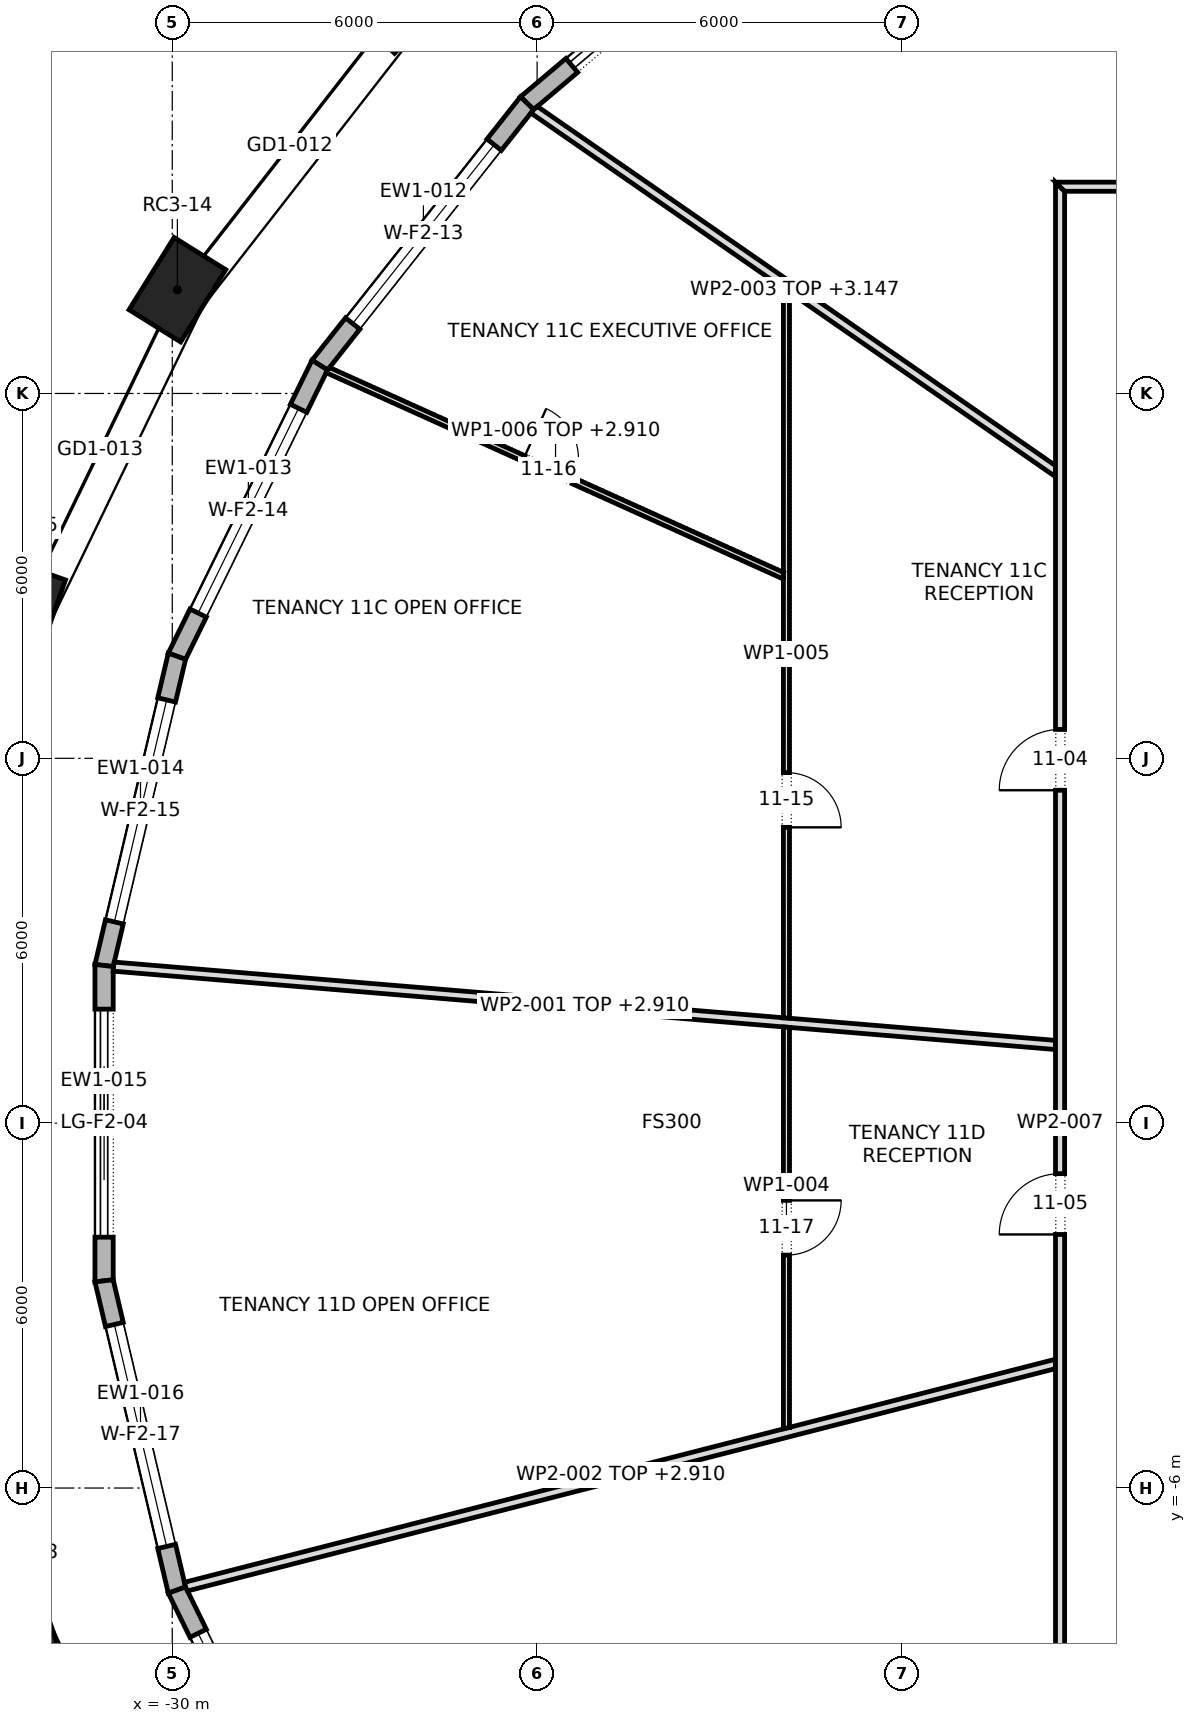
"""IFC4 building model, lengths in metres.
Left out: names, types, materials, properties, quantities, classifications, styles, units other than length and angle.
Written with IfcOpenShell. Run it as: python <this file> out.ifc"""

import sys

from ifc_helpers import new_model, si_unit, direction, frame, frame_2d, origin, origin_2d, place, context, subcontext, project, spatial, polyline, rectangle, outline, extrude, element, fill, save


model = new_model("IFC4")
c1 = context("Model", 3, precision=1e-05, world=origin(), true_north=direction((0.0, 1.0)))
c2 = subcontext(c1, "Body", "Model", "MODEL_VIEW")
j1 = project(units=[si_unit("LENGTHUNIT", "METRE"), si_unit("PLANEANGLEUNIT", "RADIAN")], contexts=[c1])
p1 = place(None, origin())
s1 = spatial("IfcSite", under=j1, at=p1, CompositionType="ELEMENT")
p2 = place(p1, origin())
s2 = spatial("IfcBuilding", under=s1, at=p2, CompositionType="ELEMENT")
p3 = place(p2, frame((0.0, 0.0, 154.9)))
s3 = spatial("IfcBuildingStorey", under=s2, at=p3, CompositionType="ELEMENT", Elevation=154.9)
for number, where, z_axis, x_axis in (
    (1, (-26.221, 18.445, 0.0), (0.0, 0.0, 1.0), (-0.692, -0.722, 0.0)),
    (2, (-29.916, 13.706, 0.0), (0.0, 0.0, 1.0), (-0.529, -0.849, 0.0)),
    (3, (-32.46, 8.44, 0.0), (0.0, 0.0, 1.0), (-0.334, -0.943, 0.0)),
    (4, (-32.46, -8.44, 0.0), (0.0, 0.0, 1.0), (0.334, -0.943, 0.0)),
):
    element("IfcColumn", number, at=place(p3, frame(where, z_axis=z_axis, x_axis=x_axis)), inside=s3, PredefinedType="COLUMN", context=c2, shape_type="SweptSolid", body=[
        extrude(rectangle(XDim=1.4, YDim=1.0, at=origin_2d()), origin(), (0.0, 0.0, 1.0), 4.2),
    ])
p4 = place(p3, frame((-19.829, 20.435, 0.0), z_axis=(0.0, 0.0, 1.0), x_axis=(-0.764076096085, -0.645126126732, 0.0)))
e5 = element("IfcWall", 5, at=p4, inside=s3, PredefinedType="STANDARD", context=c2, shape_type="SweptSolid", body=[
    extrude(outline(polyline([(-0.014, -0.15), (5.69, -0.15), (5.66, 0.15), (0.014, 0.15), (-0.014, -0.15)])), origin(), (0.0, 0.0, 1.0), 3.9),
])
p5 = place(p4, frame((0.962, 0.0, 0.0)))
e6 = element("IfcOpeningElement", 6, at=p5, cuts=e5, PredefinedType="OPENING", context=c2, shape_type="SweptSolid", body=[
    extrude(rectangle(XDim=3.75, YDim=3.45, at=frame_2d((1.875, 1.725))), frame((0.0, 0.162, 0.0), z_axis=(0.0, -1.0, 0.0), x_axis=(1.0, 0.0, 0.0)), (0.0, 0.0, 1.0), 0.324),
])
p6 = place(p3, frame((-24.165, 16.774, 0.0), z_axis=(0.0, 0.0, 1.0), x_axis=(-0.620577705153, -0.784144955902, 0.0)))
e7 = element("IfcWall", 7, at=p6, inside=s3, PredefinedType="STANDARD", context=c2, shape_type="SweptSolid", body=[
    extrude(outline(polyline([(-0.015, -0.15), (5.509, -0.15), (5.477, 0.15), (0.015, 0.15), (-0.015, -0.15)])), origin(), (0.0, 0.0, 1.0), 3.9),
])
p7 = place(p6, frame((0.871, 0.0, 0.6)))
e8 = element("IfcOpeningElement", 8, at=p7, cuts=e7, PredefinedType="OPENING", context=c2, shape_type="SweptSolid", body=[
    extrude(rectangle(XDim=3.75, YDim=2.85, at=frame_2d((1.875, 1.425))), frame((0.0, 0.162, 0.0), z_axis=(0.0, -1.0, 0.0), x_axis=(1.0, 0.0, 0.0)), (0.0, 0.0, 1.0), 0.324),
])
p8 = place(p3, frame((-27.574, 12.467, 0.0), z_axis=(0.0, 0.0, 1.0), x_axis=(-0.440444485575, -0.897779847806, 0.0)))
e9 = element("IfcWall", 9, at=p8, inside=s3, PredefinedType="STANDARD", context=c2, shape_type="SweptSolid", body=[
    extrude(outline(polyline([(-0.016, -0.15), (5.35, -0.15), (5.317, 0.15), (0.016, 0.15), (-0.016, -0.15)])), origin(), (0.0, 0.0, 1.0), 3.9),
])
p9 = place(p8, frame((0.792, 0.0, 0.6)))
e10 = element("IfcOpeningElement", 10, at=p9, cuts=e9, PredefinedType="OPENING", context=c2, shape_type="SweptSolid", body=[
    extrude(rectangle(XDim=3.75, YDim=2.85, at=frame_2d((1.875, 1.425))), frame((0.0, 0.162, 0.0), z_axis=(0.0, -1.0, 0.0), x_axis=(1.0, 0.0, 0.0)), (0.0, 0.0, 1.0), 0.324),
])
p10 = place(p3, frame((-29.923, 7.678, 0.0), z_axis=(0.0, 0.0, 1.0), x_axis=(-0.229297175564, -0.973356463624, 0.0)))
e11 = element("IfcWall", 11, at=p10, inside=s3, PredefinedType="STANDARD", context=c2, shape_type="SweptSolid", body=[
    extrude(outline(polyline([(-0.017, -0.15), (5.242, -0.15), (5.207, 0.15), (0.017, 0.15), (-0.017, -0.15)])), origin(), (0.0, 0.0, 1.0), 3.9),
])
p11 = place(p10, frame((0.737, 0.0, 0.6)))
e12 = element("IfcOpeningElement", 12, at=p11, cuts=e11, PredefinedType="OPENING", context=c2, shape_type="SweptSolid", body=[
    extrude(rectangle(XDim=3.75, YDim=2.85, at=frame_2d((1.875, 1.425))), frame((0.0, 0.162, 0.0), z_axis=(0.0, -1.0, 0.0), x_axis=(1.0, 0.0, 0.0)), (0.0, 0.0, 1.0), 0.324),
])
p12 = place(p3, frame((-31.121, 2.593, 0.0), z_axis=(0.0, 0.0, 1.0), x_axis=(0.0, -1.0, 0.0)))
e13 = element("IfcWall", 13, at=p12, inside=s3, PredefinedType="STANDARD", context=c2, shape_type="SweptSolid", body=[
    extrude(outline(polyline([(-0.017, -0.15), (5.203, -0.15), (5.168, 0.15), (0.017, 0.15), (-0.017, -0.15)])), origin(), (0.0, 0.0, 1.0), 3.9),
])
p13 = place(p12, frame((0.718, 0.0, 0.0)))
e14 = element("IfcOpeningElement", 14, at=p13, cuts=e13, PredefinedType="OPENING", context=c2, shape_type="SweptSolid", body=[
    extrude(rectangle(XDim=3.75, YDim=3.45, at=frame_2d((1.875, 1.725))), frame((0.0, 0.162, 0.0), z_axis=(0.0, -1.0, 0.0), x_axis=(1.0, 0.0, 0.0)), (0.0, 0.0, 1.0), 0.324),
])
p14 = place(p3, frame((-31.121, -2.593, 0.0), z_axis=(0.0, 0.0, 1.0), x_axis=(0.229297175564, -0.973356463624, 0.0)))
e15 = element("IfcWall", 15, at=p14, inside=s3, PredefinedType="STANDARD", context=c2, shape_type="SweptSolid", body=[
    extrude(outline(polyline([(-0.017, -0.15), (5.241, -0.15), (5.208, 0.15), (0.017, 0.15), (-0.017, -0.15)])), origin(), (0.0, 0.0, 1.0), 3.9),
])
p15 = place(p14, frame((0.737, 0.0, 0.6)))
e16 = element("IfcOpeningElement", 16, at=p15, cuts=e15, PredefinedType="OPENING", context=c2, shape_type="SweptSolid", body=[
    extrude(rectangle(XDim=3.75, YDim=2.85, at=frame_2d((1.875, 1.425))), frame((0.0, 0.162, 0.0), z_axis=(0.0, -1.0, 0.0), x_axis=(1.0, 0.0, 0.0)), (0.0, 0.0, 1.0), 0.324),
])
p16 = place(p3, frame((-29.923, -7.678, 0.0), z_axis=(0.0, 0.0, 1.0), x_axis=(0.440444485575, -0.897779847806, 0.0)))
e17 = element("IfcWall", 17, at=p16, inside=s3, PredefinedType="STANDARD", context=c2, shape_type="SweptSolid", body=[
    extrude(outline(polyline([(-0.017, -0.15), (5.35, -0.15), (5.317, 0.15), (0.017, 0.15), (-0.017, -0.15)])), origin(), (0.0, 0.0, 1.0), 3.9),
])
p17 = place(p16, frame((0.792, 0.0, 0.6)))
e18 = element("IfcOpeningElement", 18, at=p17, cuts=e17, PredefinedType="OPENING", context=c2, shape_type="SweptSolid", body=[
    extrude(rectangle(XDim=3.75, YDim=2.85, at=frame_2d((1.875, 1.425))), frame((0.0, 0.162, 0.0), z_axis=(0.0, -1.0, 0.0), x_axis=(1.0, 0.0, 0.0)), (0.0, 0.0, 1.0), 0.324),
])
p18 = place(p3, frame((-30.965, 2.574, 0.0), z_axis=(0.0, 0.0, 1.0), x_axis=(0.996560145348, -0.082872653534, 0.0)))
e19 = element("IfcWall", 19, at=p18, inside=s3, PredefinedType="PARTITIONING", context=c2, shape_type="SweptSolid", body=[
    extrude(outline(polyline([(0.0, -0.075), (1.86, -0.075), (3.72, -0.075), (5.579, -0.075), (7.439, -0.075), (9.299, -0.075), (11.159, -0.075), (11.159, -0.075), (11.159, -0.075), (12.622, -0.075), (14.086, -0.075), (15.549, -0.075), (15.549, -0.069), (15.537, 0.075), (14.045, 0.075), (12.553, 0.075), (11.061, 0.075), (11.046, 0.074), (11.046, 0.075), (9.206, 0.075), (7.366, 0.075), (5.525, 0.075), (3.685, 0.075), (1.845, 0.075), (0.004, 0.075), (0.0, 0.045), (0.0, -0.075)])), origin(), (0.0, 0.0, 1.0), 2.91),
])
p19 = place(p3, frame((-29.781, -7.623, 0.0), z_axis=(0.0, 0.0, 1.0), x_axis=(0.968729735343, 0.248118318272, 0.0)))
e20 = element("IfcWall", 20, at=p19, inside=s3, PredefinedType="PARTITIONING", context=c2, shape_type="SweptSolid", body=[
    extrude(outline(polyline([(0.013, -0.075), (1.855, -0.075), (3.697, -0.075), (5.539, -0.075), (7.381, -0.075), (9.223, -0.075), (11.064, -0.075), (12.906, -0.075), (14.748, -0.075), (14.786, 0.073), (14.786, 0.075), (13.281, 0.075), (11.776, 0.075), (10.27, 0.075), (10.27, 0.075), (10.27, 0.075), (8.558, 0.075), (6.847, 0.075), (5.135, 0.075), (3.423, 0.075), (1.712, 0.075), (0.0, 0.075), (0.0, 0.071), (0.0, -0.011), (0.013, -0.075)])), origin(), (0.0, 0.0, 1.0), 2.91),
])
p20 = place(p3, frame((-24.059, 16.673, 0.0), z_axis=(0.0, 0.0, 1.0), x_axis=(0.821818585553, -0.569749254006, 0.0)))
e21 = element("IfcWall", 21, at=p20, inside=s3, PredefinedType="PARTITIONING", context=c2, shape_type="SweptSolid", body=[
    extrude(outline(polyline([(0.0, -0.075), (1.724, -0.075), (3.448, -0.075), (5.172, -0.075), (5.173, -0.074), (5.174, -0.075), (6.948, -0.075), (8.723, -0.075), (10.497, -0.075), (10.497, -0.074), (10.394, 0.075), (8.666, 0.075), (6.938, 0.075), (5.209, 0.075), (3.481, 0.075), (1.753, 0.075), (0.025, 0.075), (0.004, -0.002), (0.0, -0.072), (0.0, -0.075)])), origin(), (0.0, 0.0, 1.0), 3.147),
])
p21 = place(p3, frame((-19.9, -5.028, 0.0), z_axis=(0.0, 0.0, 1.0), x_axis=(0.0, 1.0, 0.0)))
e22 = element("IfcWall", 22, at=p21, inside=s3, PredefinedType="PARTITIONING", context=c2, shape_type="SweptSolid", body=[
    extrude(outline(polyline([(0.025, -0.05), (1.67, -0.05), (3.314, -0.05), (4.958, -0.05), (6.603, -0.05), (6.611, 0.048), (6.611, 0.05), (4.958, 0.05), (3.305, 0.05), (1.653, 0.05), (0.0, 0.05), (0.0, 0.049), (0.025, -0.05)])), origin(), (0.0, 0.0, 1.0), 3.9),
])
p22 = place(p21, frame((2.857, 0.0, 0.0)))
e23 = element("IfcOpeningElement", 23, at=p22, cuts=e22, PredefinedType="OPENING", context=c2, shape_type="SweptSolid", body=[
    extrude(rectangle(XDim=0.9, YDim=2.1, at=frame_2d((0.45, 1.05))), frame((0.0, 0.062, 0.0), z_axis=(0.0, -1.0, 0.0), x_axis=(1.0, 0.0, 0.0)), (0.0, 0.0, 1.0), 0.124),
])
p23 = place(p3, frame((-19.9, 1.726, 0.0), z_axis=(0.0, 0.0, 1.0), x_axis=(0.0, 1.0, 0.0)))
e24 = element("IfcWall", 24, at=p23, inside=s3, PredefinedType="PARTITIONING", context=c2, shape_type="SweptSolid", body=[
    extrude(outline(polyline([(0.0, -0.05), (1.99, -0.05), (3.979, -0.05), (5.969, -0.05), (7.959, -0.05), (9.948, -0.05), (11.938, -0.05), (12.007, 0.049), (12.007, 0.05), (10.448, 0.05), (8.89, 0.05), (7.332, 0.05), (7.331, 0.048), (7.326, 0.05), (5.497, 0.05), (3.667, 0.05), (1.838, 0.05), (0.008, 0.05), (0.0, -0.047), (0.0, -0.05)])), origin(), (0.0, 0.0, 1.0), 3.9),
])
p24 = place(p23, frame((3.139, 0.0, 0.0)))
e25 = element("IfcOpeningElement", 25, at=p24, cuts=e24, PredefinedType="OPENING", context=c2, shape_type="SweptSolid", body=[
    extrude(rectangle(XDim=0.9, YDim=2.1, at=frame_2d((0.45, 1.05))), frame((0.0, 0.062, 0.0), z_axis=(0.0, -1.0, 0.0), x_axis=(1.0, 0.0, 0.0)), (0.0, 0.0, 1.0), 0.124),
])
p25 = place(p3, frame((-19.93, 8.993, 0.0), z_axis=(0.0, 0.0, 1.0), x_axis=(-0.911442933079, 0.411426518033, 0.0)))
e26 = element("IfcWall", 26, at=p25, inside=s3, PredefinedType="PARTITIONING", context=c2, shape_type="SweptSolid", body=[
    extrude(outline(polyline([(0.045, -0.05), (1.683, -0.05), (3.321, -0.05), (4.958, -0.05), (6.596, -0.05), (8.234, -0.05), (8.247, 0.0), (8.248, 0.046), (8.248, 0.05), (6.599, 0.05), (4.949, 0.05), (3.299, 0.05), (1.65, 0.05), (0.0, 0.05), (0.0, 0.049), (0.045, -0.05)])), origin(), (0.0, 0.0, 1.0), 2.91),
])
p26 = place(p25, frame((3.807, 0.0, 0.0)))
e27 = element("IfcOpeningElement", 27, at=p26, cuts=e26, PredefinedType="OPENING", context=c2, shape_type="SweptSolid", body=[
    extrude(rectangle(XDim=0.9, YDim=2.1, at=frame_2d((0.45, 1.05))), frame((0.0, 0.062, 0.0), z_axis=(0.0, -1.0, 0.0), x_axis=(1.0, 0.0, 0.0)), (0.0, 0.0, 1.0), 0.124),
])
p27 = place(p3, frame((-15.4, -15.475, 0.0), z_axis=(0.0, 0.0, 1.0), x_axis=(0.0, 1.0, 0.0)))
e28 = element("IfcWall", 28, at=p27, inside=s3, PredefinedType="PARTITIONING", context=c2, shape_type="SweptSolid", body=[
    extrude(outline(polyline([(0.15, -0.075), (2.066, -0.075), (3.981, -0.075), (5.897, -0.075), (7.812, -0.075), (9.728, -0.075), (11.644, -0.075), (13.56, -0.075), (15.475, -0.075), (17.391, -0.075), (19.306, -0.075), (21.222, -0.075), (23.138, -0.075), (25.053, -0.075), (26.969, -0.075), (28.885, -0.075), (30.8, -0.075), (30.95, 0.075), (29.016, 0.075), (27.081, 0.075), (25.147, 0.075), (23.212, 0.075), (21.278, 0.075), (19.344, 0.075), (17.409, 0.075), (15.475, 0.075), (13.541, 0.075), (11.606, 0.075), (9.672, 0.075), (7.738, 0.075), (5.803, 0.075), (3.869, 0.075), (1.935, 0.075), (0.0, 0.075), (0.15, -0.075)])), origin(), (0.0, 0.0, 1.0), 3.9),
])
p28 = place(p27, frame((20.95, 0.0, 0.0)))
e29 = element("IfcOpeningElement", 29, at=p28, cuts=e28, PredefinedType="OPENING", context=c2, shape_type="SweptSolid", body=[
    extrude(rectangle(XDim=1.0, YDim=2.1, at=frame_2d((0.5, 1.05))), frame((0.0, 0.087, 0.0), z_axis=(0.0, -1.0, 0.0), x_axis=(1.0, 0.0, 0.0)), (0.0, 0.0, 1.0), 0.174),
])
p29 = place(p27, frame((13.645, 0.0, 0.0)))
e30 = element("IfcOpeningElement", 30, at=p29, cuts=e28, PredefinedType="OPENING", context=c2, shape_type="SweptSolid", body=[
    extrude(rectangle(XDim=1.0, YDim=2.1, at=frame_2d((0.5, 1.05))), frame((0.0, 0.087, 0.0), z_axis=(0.0, -1.0, 0.0), x_axis=(1.0, 0.0, 0.0)), (0.0, 0.0, 1.0), 0.174),
])
p30 = place(p27, frame((4.905, 0.0, 0.0)))
e31 = element("IfcOpeningElement", 31, at=p30, cuts=e28, PredefinedType="OPENING", context=c2, shape_type="SweptSolid", body=[
    extrude(rectangle(XDim=1.8, YDim=2.1, at=frame_2d((0.9, 1.05))), frame((0.0, 0.087, 0.0), z_axis=(0.0, -1.0, 0.0), x_axis=(1.0, 0.0, 0.0)), (0.0, 0.0, 1.0), 0.174),
])
p31 = place(p3, frame((-15.475, 15.4, 0.0), z_axis=(0.0, 0.0, 1.0), x_axis=(1.0, 0.0, 0.0)))
e32 = element("IfcWall", 32, at=p31, inside=s3, PredefinedType="PARTITIONING", context=c2, shape_type="SweptSolid", body=[
    extrude(outline(polyline([(17.155, 0.075), (15.249, 0.075), (13.343, 0.075), (11.437, 0.075), (9.531, 0.075), (7.625, 0.075), (5.719, 0.075), (3.812, 0.075), (1.906, 0.075), (0.0, 0.075), (0.15, -0.075), (2.04, -0.075), (3.929, -0.075), (5.818, -0.075), (7.708, -0.075), (9.597, -0.075), (11.487, -0.075), (13.376, -0.075), (15.266, -0.075), (17.155, -0.075), (17.155, 0.075)])), origin(), (0.0, 0.0, 1.0), 3.9),
])
p32 = place(p31, frame((13.05, 0.0, 0.0)))
e33 = element("IfcOpeningElement", 33, at=p32, cuts=e32, PredefinedType="OPENING", context=c2, shape_type="SweptSolid", body=[
    extrude(rectangle(XDim=1.0, YDim=2.1, at=frame_2d((0.5, 1.05))), frame((0.0, 0.087, 0.0), z_axis=(0.0, -1.0, 0.0), x_axis=(1.0, 0.0, 0.0)), (0.0, 0.0, 1.0), 0.174),
])
p33 = place(p31, frame((4.51, 0.0, 0.0)))
e34 = element("IfcOpeningElement", 34, at=p33, cuts=e32, PredefinedType="OPENING", context=c2, shape_type="SweptSolid", body=[
    extrude(rectangle(XDim=1.0, YDim=2.1, at=frame_2d((0.5, 1.05))), frame((0.0, 0.087, 0.0), z_axis=(0.0, -1.0, 0.0), x_axis=(1.0, 0.0, 0.0)), (0.0, 0.0, 1.0), 0.174),
])
p34 = place(p5, origin())
e35 = element("IfcDoor", 35, at=p34, inside=s3, OperationType="DOUBLE_DOOR_SLIDING", PredefinedType="DOOR", context=c2, shape_type="SweptSolid", body=[
    extrude(rectangle(XDim=3.75, YDim=3.45, at=frame_2d((1.875, 1.725))), frame((0.0, 0.025, 0.0), z_axis=(0.0, -1.0, 0.0), x_axis=(1.0, 0.0, 0.0)), (0.0, 0.0, 1.0), 0.05),
])
fill(e6, e35)
p35 = place(p7, origin())
e36 = element("IfcWindow", 36, at=p35, inside=s3, PartitioningType="TRIPLE_PANEL_VERTICAL", PredefinedType="WINDOW", context=c2, shape_type="SweptSolid", body=[
    extrude(rectangle(XDim=3.75, YDim=2.85, at=frame_2d((1.875, 1.425))), frame((0.0, 0.03, 0.0), z_axis=(0.0, -1.0, 0.0), x_axis=(1.0, 0.0, 0.0)), (0.0, 0.0, 1.0), 0.06),
])
fill(e8, e36)
p36 = place(p9, origin())
e37 = element("IfcWindow", 37, at=p36, inside=s3, PartitioningType="TRIPLE_PANEL_VERTICAL", PredefinedType="WINDOW", context=c2, shape_type="SweptSolid", body=[
    extrude(rectangle(XDim=3.75, YDim=2.85, at=frame_2d((1.875, 1.425))), frame((0.0, 0.03, 0.0), z_axis=(0.0, -1.0, 0.0), x_axis=(1.0, 0.0, 0.0)), (0.0, 0.0, 1.0), 0.06),
])
fill(e10, e37)
p37 = place(p11, origin())
e38 = element("IfcWindow", 38, at=p37, inside=s3, PartitioningType="TRIPLE_PANEL_VERTICAL", PredefinedType="WINDOW", context=c2, shape_type="SweptSolid", body=[
    extrude(rectangle(XDim=3.75, YDim=2.85, at=frame_2d((1.875, 1.425))), frame((0.0, 0.03, 0.0), z_axis=(0.0, -1.0, 0.0), x_axis=(1.0, 0.0, 0.0)), (0.0, 0.0, 1.0), 0.06),
])
fill(e12, e38)
p38 = place(p13, origin())
e39 = element("IfcDoor", 39, at=p38, inside=s3, OperationType="DOUBLE_DOOR_SLIDING", PredefinedType="DOOR", context=c2, shape_type="SweptSolid", body=[
    extrude(rectangle(XDim=3.75, YDim=3.45, at=frame_2d((1.875, 1.725))), frame((0.0, 0.025, 0.0), z_axis=(0.0, -1.0, 0.0), x_axis=(1.0, 0.0, 0.0)), (0.0, 0.0, 1.0), 0.05),
])
fill(e14, e39)
p39 = place(p15, origin())
e40 = element("IfcWindow", 40, at=p39, inside=s3, PartitioningType="TRIPLE_PANEL_VERTICAL", PredefinedType="WINDOW", context=c2, shape_type="SweptSolid", body=[
    extrude(rectangle(XDim=3.75, YDim=2.85, at=frame_2d((1.875, 1.425))), frame((0.0, 0.03, 0.0), z_axis=(0.0, -1.0, 0.0), x_axis=(1.0, 0.0, 0.0)), (0.0, 0.0, 1.0), 0.06),
])
fill(e16, e40)
p40 = place(p17, origin())
e41 = element("IfcWindow", 41, at=p40, inside=s3, PartitioningType="TRIPLE_PANEL_VERTICAL", PredefinedType="WINDOW", context=c2, shape_type="SweptSolid", body=[
    extrude(rectangle(XDim=3.75, YDim=2.85, at=frame_2d((1.875, 1.425))), frame((0.0, 0.03, 0.0), z_axis=(0.0, -1.0, 0.0), x_axis=(1.0, 0.0, 0.0)), (0.0, 0.0, 1.0), 0.06),
])
fill(e18, e41)
p41 = place(p28, origin())
e42 = element("IfcDoor", 42, at=p41, inside=s3, OperationType="SINGLE_SWING_RIGHT", PredefinedType="DOOR", context=c2, shape_type="SweptSolid", body=[
    extrude(rectangle(XDim=1.0, YDim=2.1, at=frame_2d((0.5, 1.05))), frame((0.0, 0.025, 0.0), z_axis=(0.0, -1.0, 0.0), x_axis=(1.0, 0.0, 0.0)), (0.0, 0.0, 1.0), 0.05),
])
fill(e29, e42)
p42 = place(p29, origin())
e43 = element("IfcDoor", 43, at=p42, inside=s3, OperationType="SINGLE_SWING_RIGHT", PredefinedType="DOOR", context=c2, shape_type="SweptSolid", body=[
    extrude(rectangle(XDim=1.0, YDim=2.1, at=frame_2d((0.5, 1.05))), frame((0.0, 0.025, 0.0), z_axis=(0.0, -1.0, 0.0), x_axis=(1.0, 0.0, 0.0)), (0.0, 0.0, 1.0), 0.05),
])
fill(e30, e43)
p43 = place(p24, frame((0.9, 0.0, 0.0), z_axis=(0.0, 0.0, 1.0), x_axis=(-1.0, 0.0, 0.0)))
e44 = element("IfcDoor", 44, at=p43, inside=s3, OperationType="SINGLE_SWING_LEFT", PredefinedType="DOOR", context=c2, shape_type="SweptSolid", body=[
    extrude(rectangle(XDim=0.9, YDim=2.1, at=frame_2d((0.45, 1.05))), frame((0.0, 0.025, 0.0), z_axis=(0.0, -1.0, 0.0), x_axis=(1.0, 0.0, 0.0)), (0.0, 0.0, 1.0), 0.05),
])
fill(e25, e44)
p44 = place(p26, frame((0.9, 0.0, 0.0), z_axis=(0.0, 0.0, 1.0), x_axis=(-1.0, 0.0, 0.0)))
e45 = element("IfcDoor", 45, at=p44, inside=s3, OperationType="SINGLE_SWING_RIGHT", PredefinedType="DOOR", context=c2, shape_type="SweptSolid", body=[
    extrude(rectangle(XDim=0.9, YDim=2.1, at=frame_2d((0.45, 1.05))), frame((0.0, 0.025, 0.0), z_axis=(0.0, -1.0, 0.0), x_axis=(1.0, 0.0, 0.0)), (0.0, 0.0, 1.0), 0.05),
])
fill(e27, e45)
p45 = place(p22, frame((0.9, 0.0, 0.0), z_axis=(0.0, 0.0, 1.0), x_axis=(-1.0, 0.0, 0.0)))
e46 = element("IfcDoor", 46, at=p45, inside=s3, OperationType="SINGLE_SWING_RIGHT", PredefinedType="DOOR", context=c2, shape_type="SweptSolid", body=[
    extrude(rectangle(XDim=0.9, YDim=2.1, at=frame_2d((0.45, 1.05))), frame((0.0, 0.025, 0.0), z_axis=(0.0, -1.0, 0.0), x_axis=(1.0, 0.0, 0.0)), (0.0, 0.0, 1.0), 0.05),
])
fill(e23, e46)
save(model, sys.argv[1])
